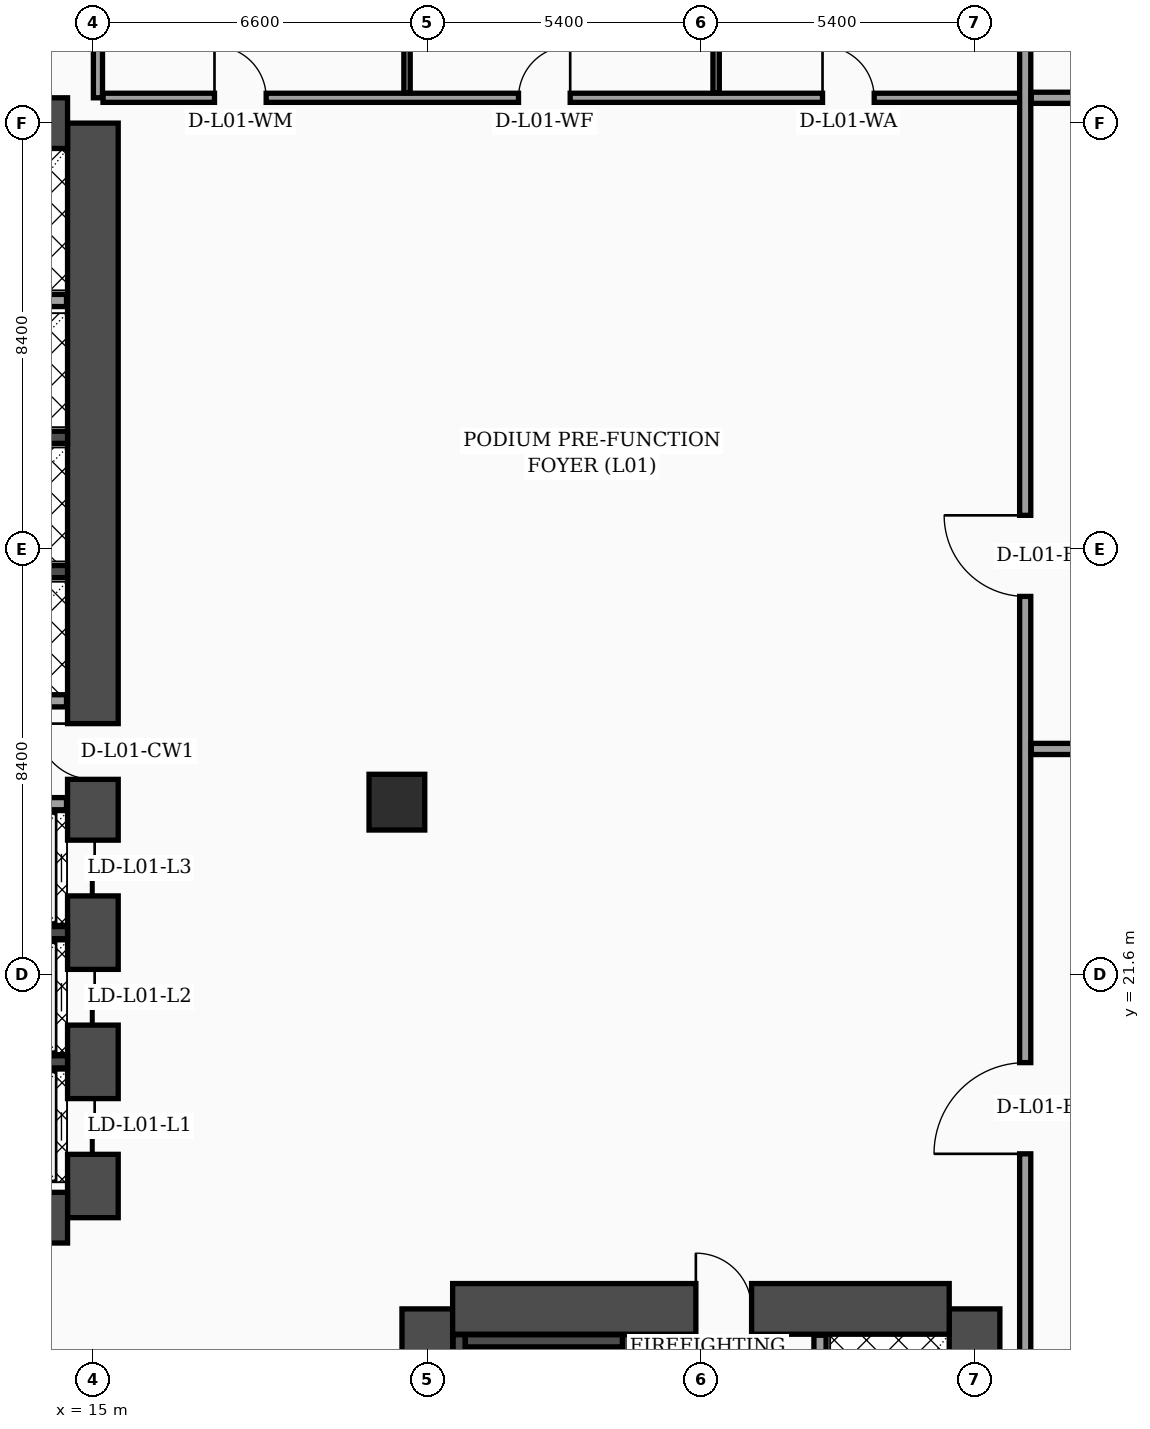
"""IFC4 building model, lengths in metres.
Left out: names, types, materials, properties, quantities, classifications, styles, units other than length and angle.
Written with IfcOpenShell. Run it as: python <this file> out.ifc"""

import sys

from ifc_helpers import new_model, si_unit, direction, frame, frame_2d, origin, origin_2d, place, context, subcontext, project, spatial, rectangle, hollow_rectangle, extrude, element, fill, save


model = new_model("IFC4")
c1 = context("Model", 3, precision=1e-05, world=origin(), true_north=direction((0.0, 1.0)))
c2 = subcontext(c1, "Body", "Model", "MODEL_VIEW")
j1 = project(units=[si_unit("LENGTHUNIT", "METRE"), si_unit("PLANEANGLEUNIT", "RADIAN")], contexts=[c1])
p1 = place(None, origin())
s1 = spatial("IfcSite", under=j1, at=p1, CompositionType="ELEMENT")
p2 = place(p1, origin())
s2 = spatial("IfcBuilding", under=s1, at=p2, CompositionType="ELEMENT")
p3 = place(p2, frame((0.0, 0.0, 6.0)))
s3 = spatial("IfcBuildingStorey", under=s2, at=p3, CompositionType="ELEMENT", Elevation=6.0)
p4 = place(p3, frame((15.0, 16.8, 0.0), z_axis=(0.0, 0.0, 1.0), x_axis=(0.0, 1.0, 0.0)))
e1 = element("IfcWall", 1, at=p4, inside=s3, PredefinedType="SHEAR", context=c2, shape_type="SweptSolid", body=[
    extrude(rectangle(XDim=21.6, YDim=1.0, at=frame_2d((10.8, 0.0))), origin(), (0.0, 0.0, 1.0), 5.68),
])
p5 = place(p4, frame((8.65, 0.0, 0.0)))
e2 = element("IfcOpeningElement", 2, at=p5, cuts=e1, PredefinedType="OPENING", context=c2, shape_type="SweptSolid", body=[
    extrude(rectangle(XDim=1.1, YDim=2.2, at=frame_2d((0.55, 1.1))), frame((0.0, 0.51, 0.0), z_axis=(0.0, -1.0, 0.0), x_axis=(1.0, 0.0, 0.0)), (0.0, 0.0, 1.0), 1.02),
])
p6 = place(p4, frame((1.25, 0.0, 0.0)))
e3 = element("IfcOpeningElement", 3, at=p6, cuts=e1, PredefinedType="OPENING", context=c2, shape_type="SweptSolid", body=[
    extrude(rectangle(XDim=1.1, YDim=2.2, at=frame_2d((0.55, 1.1))), frame((0.0, 0.51, 0.0), z_axis=(0.0, -1.0, 0.0), x_axis=(1.0, 0.0, 0.0)), (0.0, 0.0, 1.0), 1.02),
])
p7 = place(p4, frame((3.8, 0.0, 0.0)))
e4 = element("IfcOpeningElement", 4, at=p7, cuts=e1, PredefinedType="OPENING", context=c2, shape_type="SweptSolid", body=[
    extrude(rectangle(XDim=1.1, YDim=2.2, at=frame_2d((0.55, 1.1))), frame((0.0, 0.51, 0.0), z_axis=(0.0, -1.0, 0.0), x_axis=(1.0, 0.0, 0.0)), (0.0, 0.0, 1.0), 1.02),
])
p8 = place(p4, frame((6.35, 0.0, 0.0)))
e5 = element("IfcOpeningElement", 5, at=p8, cuts=e1, PredefinedType="OPENING", context=c2, shape_type="SweptSolid", body=[
    extrude(rectangle(XDim=1.1, YDim=2.2, at=frame_2d((0.55, 1.1))), frame((0.0, 0.51, 0.0), z_axis=(0.0, -1.0, 0.0), x_axis=(1.0, 0.0, 0.0)), (0.0, 0.0, 1.0), 1.02),
])
for number, where, z_axis, x_axis in (
    (6, (4.7, 38.4, 0.0), (0.0, 0.0, 1.0), (1.0, 0.0, 0.0)),
    (7, (4.7, 16.8, 0.0), (0.0, 0.0, 1.0), (1.0, 0.0, 0.0)),
):
    element("IfcWall", number, at=place(p3, frame(where, z_axis=z_axis, x_axis=x_axis)), inside=s3, PredefinedType="SHEAR", context=c2, shape_type="SweptSolid", body=[
        extrude(rectangle(XDim=9.8, YDim=1.0, at=frame_2d((4.9, 0.0))), origin(), (0.0, 0.0, 1.0), 5.68),
    ])
for number, where, z_axis, x_axis in (
    (8, (21.6, 4.6, 0.0), (0.0, 0.0, 1.0), (0.0, 1.0, 0.0)),
    (9, (32.4, 4.6, 0.0), (0.0, 0.0, 1.0), (0.0, 1.0, 0.0)),
):
    element("IfcWall", number, at=place(p3, frame(where, z_axis=z_axis, x_axis=x_axis)), inside=s3, PredefinedType="SHEAR", context=c2, shape_type="SweptSolid", body=[
        extrude(rectangle(XDim=10.4, YDim=1.0, at=frame_2d((5.2, 0.0))), origin(), (0.0, 0.0, 1.0), 5.68),
    ])
p9 = place(p3, frame((22.1, 15.0, 0.0), z_axis=(0.0, 0.0, 1.0), x_axis=(1.0, 0.0, 0.0)))
e10 = element("IfcWall", 10, at=p9, inside=s3, PredefinedType="SHEAR", context=c2, shape_type="SweptSolid", body=[
    extrude(rectangle(XDim=9.8, YDim=1.0, at=frame_2d((4.9, 0.0))), origin(), (0.0, 0.0, 1.0), 5.68),
])
p10 = place(p9, frame((4.8, 0.0, 0.0)))
e11 = element("IfcOpeningElement", 11, at=p10, cuts=e10, PredefinedType="OPENING", context=c2, shape_type="SweptSolid", body=[
    extrude(rectangle(XDim=1.1, YDim=2.2, at=frame_2d((0.55, 1.1))), frame((0.0, 0.51, 0.0), z_axis=(0.0, -1.0, 0.0), x_axis=(1.0, 0.0, 0.0)), (0.0, 0.0, 1.0), 1.02),
])
p11 = place(p3, frame((22.23, 5.1, 0.0), z_axis=(0.0, 0.0, 1.0), x_axis=(0.0, 1.0, 0.0)))
e12 = element("IfcWall", 12, at=p11, inside=s3, PredefinedType="SOLIDWALL", context=c2, shape_type="SweptSolid", body=[
    extrude(rectangle(XDim=9.39, YDim=0.24, at=frame_2d((4.695, 0.0))), origin(), (0.0, 0.0, 1.0), 5.68),
])
p12 = place(p3, frame((25.57, 5.1, 0.0), z_axis=(0.0, 0.0, 1.0), x_axis=(0.0, 1.0, 0.0)))
e13 = element("IfcWall", 13, at=p12, inside=s3, PredefinedType="SOLIDWALL", context=c2, shape_type="SweptSolid", body=[
    extrude(rectangle(XDim=9.39, YDim=0.24, at=frame_2d((4.695, 0.0))), origin(), (0.0, 0.0, 1.0), 5.68),
])
p13 = place(p12, frame((0.35, 0.0, 0.0)))
e14 = element("IfcOpeningElement", 14, at=p13, cuts=e13, PredefinedType="OPENING", context=c2, shape_type="SweptSolid", body=[
    extrude(rectangle(XDim=1.15, YDim=2.2, at=frame_2d((0.575, 1.1))), frame((0.0, 0.13, 0.0), z_axis=(0.0, -1.0, 0.0), x_axis=(1.0, 0.0, 0.0)), (0.0, 0.0, 1.0), 0.26),
])
p14 = place(p3, frame((22.35, 14.37, 0.0), z_axis=(0.0, 0.0, 1.0), x_axis=(1.0, 0.0, 0.0)))
e15 = element("IfcWall", 15, at=p14, inside=s3, PredefinedType="SOLIDWALL", context=c2, shape_type="SweptSolid", body=[
    extrude(rectangle(XDim=3.1, YDim=0.24, at=frame_2d((1.55, 0.0))), origin(), (0.0, 0.0, 1.0), 5.68),
])
for number, where, z_axis, x_axis in (
    (16, (12.18, 19.875, 0.0), (0.0, 0.0, 1.0), (1.0, 0.0, 0.0)),
    (17, (12.18, 22.425, 0.0), (0.0, 0.0, 1.0), (1.0, 0.0, 0.0)),
    (18, (12.18, 29.55, 0.0), (0.0, 0.0, 1.0), (1.0, 0.0, 0.0)),
    (19, (12.18, 32.2, 0.0), (0.0, 0.0, 1.0), (1.0, 0.0, 0.0)),
):
    element("IfcWall", number, at=place(p3, frame(where, z_axis=z_axis, x_axis=x_axis)), inside=s3, PredefinedType="SOLIDWALL", context=c2, shape_type="SweptSolid", body=[
        extrude(rectangle(XDim=2.32, YDim=0.24, at=frame_2d((1.16, 0.0))), origin(), (0.0, 0.0, 1.0), 5.68),
    ])
p15 = place(p3, frame((21.0, 25.0, 0.0), z_axis=(0.0, 0.0, 1.0), x_axis=(1.0, 0.0, 0.0)))
e20 = element("IfcColumn", 20, at=p15, inside=s3, PredefinedType="COLUMN", context=c2, shape_type="SweptSolid", body=[
    extrude(hollow_rectangle(XDim=1.1, YDim=1.1, WallThickness=0.045, at=origin_2d()), origin(), (0.0, 0.0, 1.0), 5.68),
])
p16 = place(p3, frame((12.15, 24.97, 0.0), z_axis=(0.0, 0.0, 1.0), x_axis=(1.0, 0.0, 0.0)))
e21 = element("IfcWall", 21, at=p16, inside=s3, PredefinedType="SOLIDWALL", context=c2, shape_type="SweptSolid", body=[
    extrude(rectangle(XDim=2.33, YDim=0.24, at=frame_2d((1.165, 0.0))), origin(), (0.0, 0.0, 1.0), 4.88),
])
p17 = place(p3, frame((12.25, 27.0, 0.0), z_axis=(0.0, 0.0, 1.0), x_axis=(1.0, 0.0, 0.0)))
e22 = element("IfcWall", 22, at=p17, inside=s3, PredefinedType="SOLIDWALL", context=c2, shape_type="SweptSolid", body=[
    extrude(rectangle(XDim=2.23, YDim=0.24, at=frame_2d((1.115, 0.0))), origin(), (0.0, 0.0, 1.0), 5.68),
])
p18 = place(p3, frame((9.66, 34.9, 0.0), z_axis=(0.0, 0.0, 1.0), x_axis=(1.0, 0.0, 0.0)))
e23 = element("IfcWall", 23, at=p18, inside=s3, PredefinedType="SOLIDWALL", context=c2, shape_type="SweptSolid", body=[
    extrude(rectangle(XDim=4.82, YDim=0.24, at=frame_2d((2.41, 0.0))), origin(), (0.0, 0.0, 1.0), 5.68),
])
p19 = place(p3, frame((29.35, 5.12, 0.0), z_axis=(0.0, 0.0, 1.0), x_axis=(0.0, 1.0, 0.0)))
e24 = element("IfcWall", 24, at=p19, inside=s3, PredefinedType="SOLIDWALL", context=c2, shape_type="SweptSolid", body=[
    extrude(rectangle(XDim=9.36, YDim=0.24, at=frame_2d((4.68, 0.0))), origin(), (0.0, 0.0, 1.0), 5.68),
])
p20 = place(p19, frame((0.55, 0.0, 0.0)))
e25 = element("IfcOpeningElement", 25, at=p20, cuts=e24, PredefinedType="OPENING", context=c2, shape_type="SweptSolid", body=[
    extrude(rectangle(XDim=1.3, YDim=2.35, at=frame_2d((0.65, 1.175))), frame((0.0, 0.13, 0.0), z_axis=(0.0, -1.0, 0.0), x_axis=(1.0, 0.0, 0.0)), (0.0, 0.0, 1.0), 0.26),
])
p21 = place(p3, frame((15.2, 38.9, 0.0), z_axis=(0.0, 0.0, 1.0), x_axis=(1.0, 0.0, 0.0)))
e26 = element("IfcWall", 26, at=p21, inside=s3, PredefinedType="PARTITIONING", context=c2, shape_type="SweptSolid", body=[
    extrude(rectangle(XDim=18.1, YDim=0.18, at=frame_2d((9.05, 0.0))), origin(), (0.0, 0.0, 1.0), 4.88),
])
p22 = place(p21, frame((2.2, 0.0, 0.0)))
e27 = element("IfcOpeningElement", 27, at=p22, cuts=e26, PredefinedType="OPENING", context=c2, shape_type="SweptSolid", body=[
    extrude(rectangle(XDim=1.02, YDim=2.2, at=frame_2d((0.51, 1.1))), frame((0.0, 0.1, 0.0), z_axis=(0.0, -1.0, 0.0), x_axis=(1.0, 0.0, 0.0)), (0.0, 0.0, 1.0), 0.2),
])
p23 = place(p21, frame((8.2, 0.0, 0.0)))
e28 = element("IfcOpeningElement", 28, at=p23, cuts=e26, PredefinedType="OPENING", context=c2, shape_type="SweptSolid", body=[
    extrude(rectangle(XDim=1.02, YDim=2.2, at=frame_2d((0.51, 1.1))), frame((0.0, 0.1, 0.0), z_axis=(0.0, -1.0, 0.0), x_axis=(1.0, 0.0, 0.0)), (0.0, 0.0, 1.0), 0.2),
])
p24 = place(p21, frame((14.2, 0.0, 0.0)))
e29 = element("IfcOpeningElement", 29, at=p24, cuts=e26, PredefinedType="OPENING", context=c2, shape_type="SweptSolid", body=[
    extrude(rectangle(XDim=1.02, YDim=2.2, at=frame_2d((0.51, 1.1))), frame((0.0, 0.1, 0.0), z_axis=(0.0, -1.0, 0.0), x_axis=(1.0, 0.0, 0.0)), (0.0, 0.0, 1.0), 0.2),
])
p25 = place(p3, frame((15.1, 38.9, 0.0), z_axis=(0.0, 0.0, 1.0), x_axis=(0.0, 1.0, 0.0)))
e30 = element("IfcWall", 30, at=p25, inside=s3, PredefinedType="PARTITIONING", context=c2, shape_type="SweptSolid", body=[
    extrude(rectangle(XDim=6.4, YDim=0.18, at=frame_2d((3.2, 0.0))), origin(), (0.0, 0.0, 1.0), 4.88),
])
p26 = place(p3, frame((21.2, 39.0, 0.0), z_axis=(0.0, 0.0, 1.0), x_axis=(0.0, 1.0, 0.0)))
e31 = element("IfcWall", 31, at=p26, inside=s3, PredefinedType="PARTITIONING", context=c2, shape_type="SweptSolid", body=[
    extrude(rectangle(XDim=6.2, YDim=0.125, at=frame_2d((3.1, 0.0))), origin(), (0.0, 0.0, 1.0), 4.88),
])
p27 = place(p3, frame((27.3, 39.0, 0.0), z_axis=(0.0, 0.0, 1.0), x_axis=(0.0, 1.0, 0.0)))
e32 = element("IfcWall", 32, at=p27, inside=s3, PredefinedType="PARTITIONING", context=c2, shape_type="SweptSolid", body=[
    extrude(rectangle(XDim=6.2, YDim=0.125, at=frame_2d((3.1, 0.0))), origin(), (0.0, 0.0, 1.0), 5.68),
])
p28 = place(p3, frame((33.4, 0.06, 0.0), z_axis=(0.0, 0.0, 1.0), x_axis=(0.0, 1.0, 0.0)))
e33 = element("IfcWall", 33, at=p28, inside=s3, PredefinedType="SOLIDWALL", context=c2, shape_type="SweptSolid", body=[
    extrude(rectangle(XDim=57.88, YDim=0.22, at=frame_2d((28.94, 0.0))), origin(), (0.0, 0.0, 1.0), 4.88),
])
p29 = place(p28, frame((18.0, 0.0, 0.0)))
e34 = element("IfcOpeningElement", 34, at=p29, cuts=e33, PredefinedType="OPENING", context=c2, shape_type="SweptSolid", body=[
    extrude(rectangle(XDim=1.8, YDim=2.4, at=frame_2d((0.9, 1.2))), frame((0.0, 0.12, 0.0), z_axis=(0.0, -1.0, 0.0), x_axis=(1.0, 0.0, 0.0)), (0.0, 0.0, 1.0), 0.24),
])
p30 = place(p28, frame((29.0, 0.0, 0.0)))
e35 = element("IfcOpeningElement", 35, at=p30, cuts=e33, PredefinedType="OPENING", context=c2, shape_type="SweptSolid", body=[
    extrude(rectangle(XDim=1.6, YDim=2.35, at=frame_2d((0.8, 1.175))), frame((0.0, 0.12, 0.0), z_axis=(0.0, -1.0, 0.0), x_axis=(1.0, 0.0, 0.0)), (0.0, 0.0, 1.0), 0.24),
])
p31 = place(p28, frame((49.0, 0.0, 0.0)))
e36 = element("IfcOpeningElement", 36, at=p31, cuts=e33, PredefinedType="OPENING", context=c2, shape_type="SweptSolid", body=[
    extrude(rectangle(XDim=1.5, YDim=2.22, at=frame_2d((0.75, 1.11))), frame((0.0, 0.12, 0.0), z_axis=(0.0, -1.0, 0.0), x_axis=(1.0, 0.0, 0.0)), (0.0, 0.0, 1.0), 0.24),
])
p32 = place(p3, frame((33.52, 26.05, 0.0), z_axis=(0.0, 0.0, 1.0), x_axis=(1.0, 0.0, 0.0)))
e37 = element("IfcWall", 37, at=p32, inside=s3, PredefinedType="SOLIDWALL", context=c2, shape_type="SweptSolid", body=[
    extrude(rectangle(XDim=50.42, YDim=0.22, at=frame_2d((25.21, 0.0))), origin(), (0.0, 0.0, 1.0), 4.18),
])
p33 = place(p3, frame((33.52, 38.9, 0.0), z_axis=(0.0, 0.0, 1.0), x_axis=(1.0, 0.0, 0.0)))
e38 = element("IfcWall", 38, at=p33, inside=s3, PredefinedType="SOLIDWALL", context=c2, shape_type="SweptSolid", body=[
    extrude(rectangle(XDim=50.42, YDim=0.22, at=frame_2d((25.21, 0.0))), origin(), (0.0, 0.0, 1.0), 4.88),
])
p34 = place(p33, frame((15.0, 0.0, 0.0)))
e39 = element("IfcOpeningElement", 39, at=p34, cuts=e38, PredefinedType="OPENING", context=c2, shape_type="SweptSolid", body=[
    extrude(rectangle(XDim=1.6, YDim=2.35, at=frame_2d((0.8, 1.175))), frame((0.0, 0.12, 0.0), z_axis=(0.0, -1.0, 0.0), x_axis=(1.0, 0.0, 0.0)), (0.0, 0.0, 1.0), 0.24),
])
p35 = place(p22, origin())
e40 = element("IfcDoor", 40, at=p35, inside=s3, OperationType="SINGLE_SWING_LEFT", PredefinedType="DOOR", context=c2, shape_type="SweptSolid", body=[
    extrude(rectangle(XDim=1.02, YDim=2.2, at=frame_2d((0.51, 1.1))), frame((0.0, 0.025, 0.0), z_axis=(0.0, -1.0, 0.0), x_axis=(1.0, 0.0, 0.0)), (0.0, 0.0, 1.0), 0.05),
])
fill(e27, e40)
p36 = place(p23, origin())
e41 = element("IfcDoor", 41, at=p36, inside=s3, OperationType="SINGLE_SWING_RIGHT", PredefinedType="DOOR", context=c2, shape_type="SweptSolid", body=[
    extrude(rectangle(XDim=1.02, YDim=2.2, at=frame_2d((0.51, 1.1))), frame((0.0, 0.025, 0.0), z_axis=(0.0, -1.0, 0.0), x_axis=(1.0, 0.0, 0.0)), (0.0, 0.0, 1.0), 0.05),
])
fill(e28, e41)
p37 = place(p24, origin())
e42 = element("IfcDoor", 42, at=p37, inside=s3, OperationType="SINGLE_SWING_LEFT", PredefinedType="DOOR", context=c2, shape_type="SweptSolid", body=[
    extrude(rectangle(XDim=1.02, YDim=2.2, at=frame_2d((0.51, 1.1))), frame((0.0, 0.025, 0.0), z_axis=(0.0, -1.0, 0.0), x_axis=(1.0, 0.0, 0.0)), (0.0, 0.0, 1.0), 0.05),
])
fill(e29, e42)
p38 = place(p29, origin())
e43 = element("IfcDoor", 43, at=p38, inside=s3, OperationType="SINGLE_SWING_LEFT", PredefinedType="DOOR", context=c2, shape_type="SweptSolid", body=[
    extrude(rectangle(XDim=1.8, YDim=2.4, at=frame_2d((0.9, 1.2))), frame((0.0, 0.025, 0.0), z_axis=(0.0, -1.0, 0.0), x_axis=(1.0, 0.0, 0.0)), (0.0, 0.0, 1.0), 0.05),
])
fill(e34, e43)
p39 = place(p30, origin())
e44 = element("IfcDoor", 44, at=p39, inside=s3, OperationType="SINGLE_SWING_RIGHT", PredefinedType="DOOR", context=c2, shape_type="SweptSolid", body=[
    extrude(rectangle(XDim=1.6, YDim=2.35, at=frame_2d((0.8, 1.175))), frame((0.0, 0.025, 0.0), z_axis=(0.0, -1.0, 0.0), x_axis=(1.0, 0.0, 0.0)), (0.0, 0.0, 1.0), 0.05),
])
fill(e35, e44)
p40 = place(p5, origin())
e45 = element("IfcDoor", 45, at=p40, inside=s3, OperationType="SINGLE_SWING_RIGHT", PredefinedType="DOOR", context=c2, shape_type="SweptSolid", body=[
    extrude(rectangle(XDim=1.1, YDim=2.2, at=frame_2d((0.55, 1.1))), frame((0.0, 0.025, 0.0), z_axis=(0.0, -1.0, 0.0), x_axis=(1.0, 0.0, 0.0)), (0.0, 0.0, 1.0), 0.05),
])
fill(e2, e45)
p41 = place(p6, origin())
e46 = element("IfcDoor", 46, at=p41, inside=s3, OperationType="DOUBLE_DOOR_SLIDING", PredefinedType="DOOR", context=c2, shape_type="SweptSolid", body=[
    extrude(rectangle(XDim=1.1, YDim=2.2, at=frame_2d((0.55, 1.1))), frame((0.0, 0.025, 0.0), z_axis=(0.0, -1.0, 0.0), x_axis=(1.0, 0.0, 0.0)), (0.0, 0.0, 1.0), 0.05),
])
fill(e3, e46)
p42 = place(p7, origin())
e47 = element("IfcDoor", 47, at=p42, inside=s3, OperationType="DOUBLE_DOOR_SLIDING", PredefinedType="DOOR", context=c2, shape_type="SweptSolid", body=[
    extrude(rectangle(XDim=1.1, YDim=2.2, at=frame_2d((0.55, 1.1))), frame((0.0, 0.025, 0.0), z_axis=(0.0, -1.0, 0.0), x_axis=(1.0, 0.0, 0.0)), (0.0, 0.0, 1.0), 0.05),
])
fill(e4, e47)
p43 = place(p8, origin())
e48 = element("IfcDoor", 48, at=p43, inside=s3, OperationType="DOUBLE_DOOR_SLIDING", PredefinedType="DOOR", context=c2, shape_type="SweptSolid", body=[
    extrude(rectangle(XDim=1.1, YDim=2.2, at=frame_2d((0.55, 1.1))), frame((0.0, 0.025, 0.0), z_axis=(0.0, -1.0, 0.0), x_axis=(1.0, 0.0, 0.0)), (0.0, 0.0, 1.0), 0.05),
])
fill(e5, e48)
p44 = place(p10, origin())
e49 = element("IfcDoor", 49, at=p44, inside=s3, OperationType="SINGLE_SWING_LEFT", PredefinedType="DOOR", context=c2, shape_type="SweptSolid", body=[
    extrude(rectangle(XDim=1.1, YDim=2.2, at=frame_2d((0.55, 1.1))), frame((0.0, 0.025, 0.0), z_axis=(0.0, -1.0, 0.0), x_axis=(1.0, 0.0, 0.0)), (0.0, 0.0, 1.0), 0.05),
])
fill(e11, e49)
save(model, sys.argv[1])
